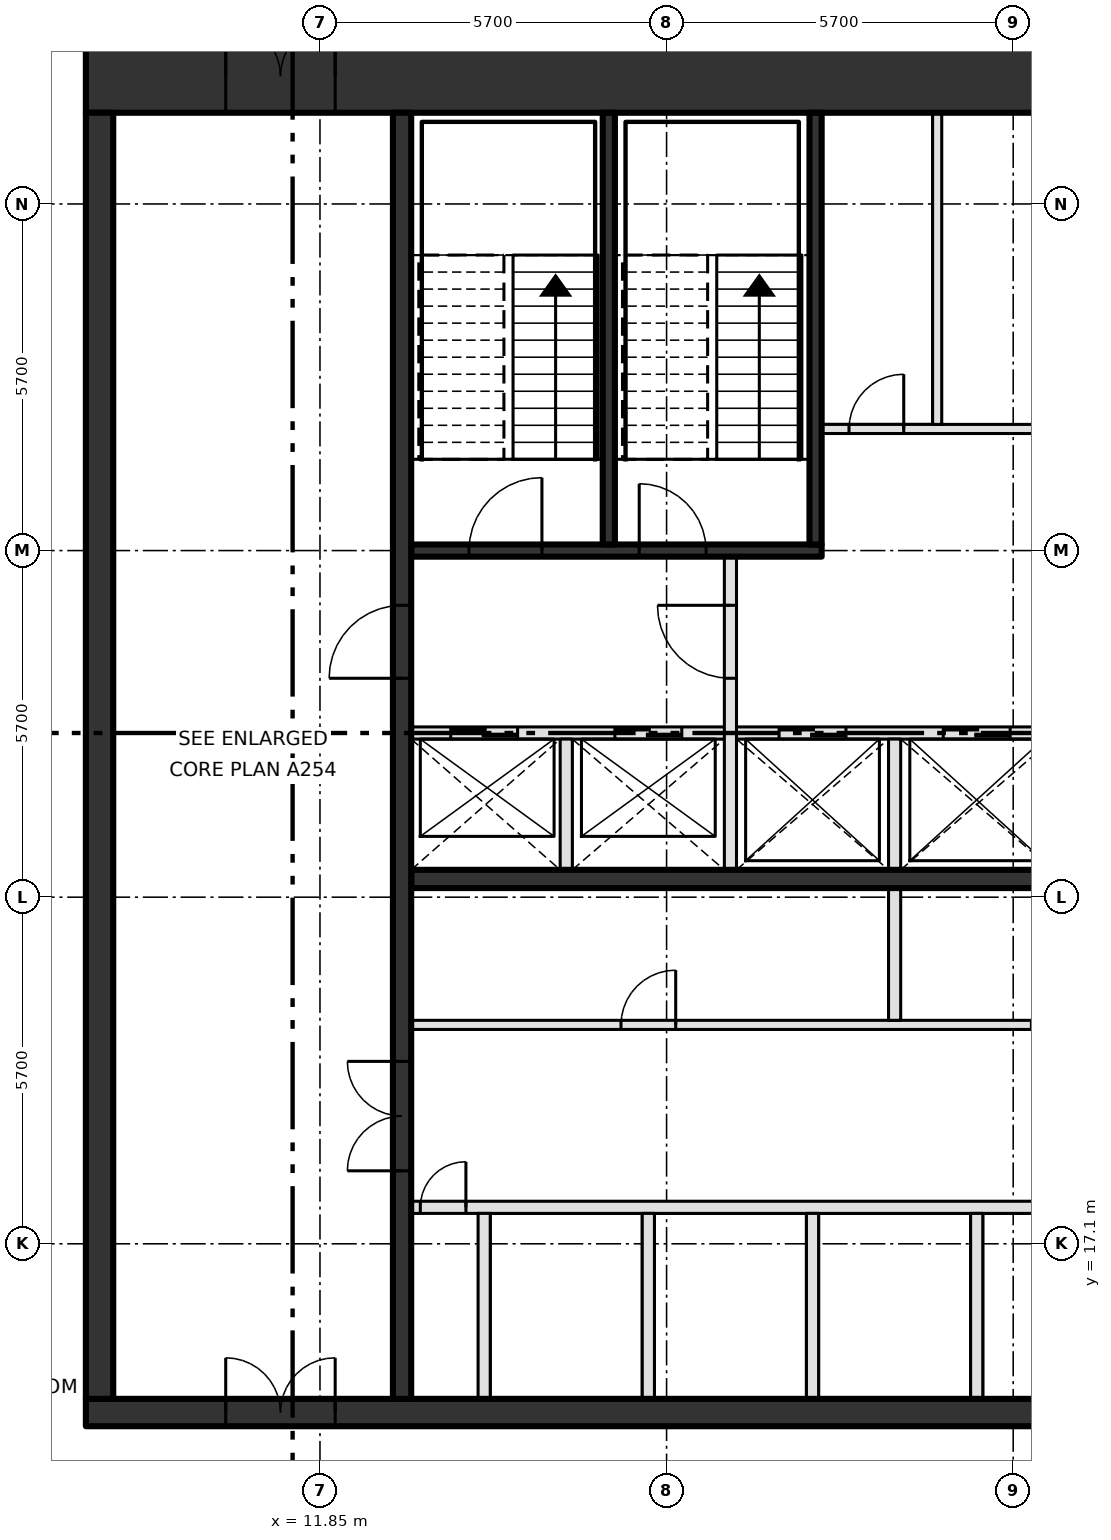
"""IFC4 building model, lengths in metres.
Left out: names, types, materials, properties, quantities, classifications, styles, units other than length and angle.
Written with IfcOpenShell. Run it as: python <this file> out.ifc"""

import sys

from ifc_helpers import new_model, si_unit, direction, frame, frame_2d, origin, place, context, subcontext, project, spatial, rectangle, extrude, element, fill, save


model = new_model("IFC4")
c1 = context("Model", 3, precision=1e-05, world=origin(), true_north=direction((0.0, 1.0)))
c2 = subcontext(c1, "Body", "Model", "MODEL_VIEW")
j1 = project(units=[si_unit("LENGTHUNIT", "METRE"), si_unit("PLANEANGLEUNIT", "RADIAN")], contexts=[c1])
p1 = place(None, origin())
s1 = spatial("IfcSite", under=j1, at=p1, CompositionType="ELEMENT")
p2 = place(p1, origin())
s2 = spatial("IfcBuilding", under=s1, at=p2, CompositionType="ELEMENT")
p3 = place(p2, frame((0.0, 0.0, 400.2)))
s3 = spatial("IfcBuildingStorey", under=s2, at=p3, CompositionType="ELEMENT", Elevation=400.2)
p4 = place(p3, frame((8.0, 14.325, -0.45), z_axis=(0.0, 0.0, 1.0), x_axis=(1.0, 0.0, 0.0)))
e1 = element("IfcWall", 1, at=p4, inside=s3, PredefinedType="SHEAR", context=c2, shape_type="SweptSolid", body=[
    extrude(rectangle(XDim=22.8, YDim=0.45, at=frame_2d((11.4, 0.0))), origin(), (0.0, 0.0, 1.0), 4.95),
])
p5 = place(p4, frame((2.3, 0.0, 0.45)))
e2 = element("IfcOpeningElement", 2, at=p5, cuts=e1, PredefinedType="OPENING", context=c2, shape_type="SweptSolid", body=[
    extrude(rectangle(XDim=1.8, YDim=2.1, at=frame_2d((0.9, 1.05))), frame((0.0, 0.235, 0.0), z_axis=(0.0, -1.0, 0.0), x_axis=(1.0, 0.0, 0.0)), (0.0, 0.0, 1.0), 0.47),
])
p6 = place(p3, frame((8.0, 36.3, -0.45), z_axis=(0.0, 0.0, 1.0), x_axis=(1.0, 0.0, 0.0)))
e3 = element("IfcWall", 3, at=p6, inside=s3, PredefinedType="SHEAR", context=c2, shape_type="SweptSolid", body=[
    extrude(rectangle(XDim=22.8, YDim=1.2, at=frame_2d((11.4, 0.0))), origin(), (0.0, 0.0, 1.0), 4.95),
])
p7 = place(p6, frame((2.3, 0.0, 0.45)))
e4 = element("IfcOpeningElement", 4, at=p7, cuts=e3, PredefinedType="OPENING", context=c2, shape_type="SweptSolid", body=[
    extrude(rectangle(XDim=1.8, YDim=2.1, at=frame_2d((0.9, 1.05))), frame((0.0, 0.61, 0.0), z_axis=(0.0, -1.0, 0.0), x_axis=(1.0, 0.0, 0.0)), (0.0, 0.0, 1.0), 1.22),
])
p8 = place(p3, frame((8.225, 14.55, -0.45), z_axis=(0.0, 0.0, 1.0), x_axis=(0.0, 1.0, 0.0)))
e5 = element("IfcWall", 5, at=p8, inside=s3, PredefinedType="SHEAR", context=c2, shape_type="SweptSolid", body=[
    extrude(rectangle(XDim=21.15, YDim=0.45, at=frame_2d((10.575, 0.0))), origin(), (0.0, 0.0, 1.0), 4.95),
])
p9 = place(p3, frame((13.35, 17.7, 0.0), z_axis=(0.0, 0.0, 1.0), x_axis=(1.0, 0.0, 0.0)))
e6 = element("IfcWall", 6, at=p9, inside=s3, PredefinedType="SOLIDWALL", context=c2, shape_type="SweptSolid", body=[
    extrude(rectangle(XDim=13.425, YDim=0.2, at=frame_2d((6.712, 0.0))), origin(), (0.0, 0.0, 1.0), 4.5),
])
p10 = place(p9, frame((0.15, 0.0, 0.0)))
e7 = element("IfcOpeningElement", 7, at=p10, cuts=e6, PredefinedType="OPENING", context=c2, shape_type="SweptSolid", body=[
    extrude(rectangle(XDim=0.75, YDim=2.1, at=frame_2d((0.375, 1.05))), frame((0.0, 0.11, 0.0), z_axis=(0.0, -1.0, 0.0), x_axis=(1.0, 0.0, 0.0)), (0.0, 0.0, 1.0), 0.22),
])
p11 = place(p9, frame((12.3, 0.0, 0.0)))
e8 = element("IfcOpeningElement", 8, at=p11, cuts=e6, PredefinedType="OPENING", context=c2, shape_type="SweptSolid", body=[
    extrude(rectangle(XDim=0.75, YDim=2.1, at=frame_2d((0.375, 1.05))), frame((0.0, 0.11, 0.0), z_axis=(0.0, -1.0, 0.0), x_axis=(1.0, 0.0, 0.0)), (0.0, 0.0, 1.0), 0.22),
])
p12 = place(p3, frame((13.35, 20.7, 0.0), z_axis=(0.0, 0.0, 1.0), x_axis=(1.0, 0.0, 0.0)))
e9 = element("IfcWall", 9, at=p12, inside=s3, PredefinedType="PARTITIONING", context=c2, shape_type="SweptSolid", body=[
    extrude(rectangle(XDim=13.425, YDim=0.15, at=frame_2d((6.712, 0.0))), origin(), (0.0, 0.0, 1.0), 4.5),
])
p13 = place(p12, frame((3.45, 0.0, 0.0)))
e10 = element("IfcOpeningElement", 10, at=p13, cuts=e9, PredefinedType="OPENING", context=c2, shape_type="SweptSolid", body=[
    extrude(rectangle(XDim=0.9, YDim=2.1, at=frame_2d((0.45, 1.05))), frame((0.0, 0.085, 0.0), z_axis=(0.0, -1.0, 0.0), x_axis=(1.0, 0.0, 0.0)), (0.0, 0.0, 1.0), 0.17),
])
p14 = place(p12, frame((10.2, 0.0, 0.0)))
e11 = element("IfcOpeningElement", 11, at=p14, cuts=e9, PredefinedType="OPENING", context=c2, shape_type="SweptSolid", body=[
    extrude(rectangle(XDim=0.9, YDim=2.1, at=frame_2d((0.45, 1.05))), frame((0.0, 0.085, 0.0), z_axis=(0.0, -1.0, 0.0), x_axis=(1.0, 0.0, 0.0)), (0.0, 0.0, 1.0), 0.17),
])
p15 = place(p3, frame((13.35, 23.1, 0.0), z_axis=(0.0, 0.0, 1.0), x_axis=(1.0, 0.0, 0.0)))
e12 = element("IfcWall", 12, at=p15, inside=s3, PredefinedType="SHEAR", context=c2, shape_type="SweptSolid", body=[
    extrude(rectangle(XDim=17.0, YDim=0.3, at=frame_2d((8.5, 0.0))), origin(), (0.0, 0.0, 1.0), 4.5),
])
p16 = place(p3, frame((13.35, 25.5, 0.0), z_axis=(0.0, 0.0, 1.0), x_axis=(1.0, 0.0, 0.0)))
e13 = element("IfcWall", 13, at=p16, inside=s3, PredefinedType="SOLIDWALL", context=c2, shape_type="SweptSolid", body=[
    extrude(rectangle(XDim=17.0, YDim=0.2, at=frame_2d((8.5, 0.0))), origin(), (0.0, 0.0, 1.0), 4.5),
])
p17 = place(p16, frame((0.65, 0.0, 0.0)))
e14 = element("IfcOpeningElement", 14, at=p17, cuts=e13, PredefinedType="OPENING", context=c2, shape_type="SweptSolid", body=[
    extrude(rectangle(XDim=1.1, YDim=2.1, at=frame_2d((0.55, 1.05))), frame((0.0, 0.11, 0.0), z_axis=(0.0, -1.0, 0.0), x_axis=(1.0, 0.0, 0.0)), (0.0, 0.0, 1.0), 0.22),
])
p18 = place(p16, frame((3.35, 0.0, 0.0)))
e15 = element("IfcOpeningElement", 15, at=p18, cuts=e13, PredefinedType="OPENING", context=c2, shape_type="SweptSolid", body=[
    extrude(rectangle(XDim=1.1, YDim=2.1, at=frame_2d((0.55, 1.05))), frame((0.0, 0.11, 0.0), z_axis=(0.0, -1.0, 0.0), x_axis=(1.0, 0.0, 0.0)), (0.0, 0.0, 1.0), 0.22),
])
p19 = place(p16, frame((6.05, 0.0, 0.0)))
e16 = element("IfcOpeningElement", 16, at=p19, cuts=e13, PredefinedType="OPENING", context=c2, shape_type="SweptSolid", body=[
    extrude(rectangle(XDim=1.1, YDim=2.1, at=frame_2d((0.55, 1.05))), frame((0.0, 0.11, 0.0), z_axis=(0.0, -1.0, 0.0), x_axis=(1.0, 0.0, 0.0)), (0.0, 0.0, 1.0), 0.22),
])
p20 = place(p16, frame((8.75, 0.0, 0.0)))
e17 = element("IfcOpeningElement", 17, at=p20, cuts=e13, PredefinedType="OPENING", context=c2, shape_type="SweptSolid", body=[
    extrude(rectangle(XDim=1.1, YDim=2.1, at=frame_2d((0.55, 1.05))), frame((0.0, 0.11, 0.0), z_axis=(0.0, -1.0, 0.0), x_axis=(1.0, 0.0, 0.0)), (0.0, 0.0, 1.0), 0.22),
])
p21 = place(p16, frame((13.0, 0.0, 0.0)))
e18 = element("IfcOpeningElement", 18, at=p21, cuts=e13, PredefinedType="OPENING", context=c2, shape_type="SweptSolid", body=[
    extrude(rectangle(XDim=0.9, YDim=2.1, at=frame_2d((0.45, 1.05))), frame((0.0, 0.11, 0.0), z_axis=(0.0, -1.0, 0.0), x_axis=(1.0, 0.0, 0.0)), (0.0, 0.0, 1.0), 0.22),
])
p22 = place(p3, frame((13.35, 28.5, 0.0), z_axis=(0.0, 0.0, 1.0), x_axis=(1.0, 0.0, 0.0)))
e19 = element("IfcWall", 19, at=p22, inside=s3, PredefinedType="SOLIDWALL", context=c2, shape_type="SweptSolid", body=[
    extrude(rectangle(XDim=6.75, YDim=0.2, at=frame_2d((3.375, 0.0))), origin(), (0.0, 0.0, 1.0), 4.5),
])
p23 = place(p22, frame((0.95, 0.0, 0.0)))
e20 = element("IfcOpeningElement", 20, at=p23, cuts=e19, PredefinedType="OPENING", context=c2, shape_type="SweptSolid", body=[
    extrude(rectangle(XDim=1.2, YDim=2.1, at=frame_2d((0.6, 1.05))), frame((0.0, 0.11, 0.0), z_axis=(0.0, -1.0, 0.0), x_axis=(1.0, 0.0, 0.0)), (0.0, 0.0, 1.0), 0.22),
])
p24 = place(p22, frame((3.75, 0.0, 0.0)))
e21 = element("IfcOpeningElement", 21, at=p24, cuts=e19, PredefinedType="OPENING", context=c2, shape_type="SweptSolid", body=[
    extrude(rectangle(XDim=1.1, YDim=2.1, at=frame_2d((0.55, 1.05))), frame((0.0, 0.11, 0.0), z_axis=(0.0, -1.0, 0.0), x_axis=(1.0, 0.0, 0.0)), (0.0, 0.0, 1.0), 0.22),
])
p25 = place(p3, frame((20.1, 30.5, 0.0), z_axis=(0.0, 0.0, 1.0), x_axis=(1.0, 0.0, 0.0)))
e22 = element("IfcWall", 22, at=p25, inside=s3, PredefinedType="PARTITIONING", context=c2, shape_type="SweptSolid", body=[
    extrude(rectangle(XDim=10.25, YDim=0.15, at=frame_2d((5.125, 0.0))), origin(), (0.0, 0.0, 1.0), 4.5),
])
p26 = place(p25, frame((0.45, 0.0, 0.0)))
e23 = element("IfcOpeningElement", 23, at=p26, cuts=e22, PredefinedType="OPENING", context=c2, shape_type="SweptSolid", body=[
    extrude(rectangle(XDim=0.9, YDim=2.1, at=frame_2d((0.45, 1.05))), frame((0.0, 0.085, 0.0), z_axis=(0.0, -1.0, 0.0), x_axis=(1.0, 0.0, 0.0)), (0.0, 0.0, 1.0), 0.17),
])
p27 = place(p25, frame((5.25, 0.0, 0.0)))
e24 = element("IfcOpeningElement", 24, at=p27, cuts=e22, PredefinedType="OPENING", context=c2, shape_type="SweptSolid", body=[
    extrude(rectangle(XDim=0.9, YDim=2.1, at=frame_2d((0.45, 1.05))), frame((0.0, 0.085, 0.0), z_axis=(0.0, -1.0, 0.0), x_axis=(1.0, 0.0, 0.0)), (0.0, 0.0, 1.0), 0.17),
])
p28 = place(p3, frame((13.2, 14.55, 0.0), z_axis=(0.0, 0.0, 1.0), x_axis=(0.0, 1.0, 0.0)))
e25 = element("IfcWall", 25, at=p28, inside=s3, PredefinedType="SHEAR", context=c2, shape_type="SweptSolid", body=[
    extrude(rectangle(XDim=21.15, YDim=0.3, at=frame_2d((10.575, 0.0))), origin(), (0.0, 0.0, 1.0), 4.5),
])
p29 = place(p28, frame((3.75, 0.0, 0.0)))
e26 = element("IfcOpeningElement", 26, at=p29, cuts=e25, PredefinedType="OPENING", context=c2, shape_type="SweptSolid", body=[
    extrude(rectangle(XDim=1.8, YDim=2.1, at=frame_2d((0.9, 1.05))), frame((0.0, 0.16, 0.0), z_axis=(0.0, -1.0, 0.0), x_axis=(1.0, 0.0, 0.0)), (0.0, 0.0, 1.0), 0.32),
])
p30 = place(p28, frame((11.85, 0.0, 0.0)))
e27 = element("IfcOpeningElement", 27, at=p30, cuts=e25, PredefinedType="OPENING", context=c2, shape_type="SweptSolid", body=[
    extrude(rectangle(XDim=1.2, YDim=2.1, at=frame_2d((0.6, 1.05))), frame((0.0, 0.16, 0.0), z_axis=(0.0, -1.0, 0.0), x_axis=(1.0, 0.0, 0.0)), (0.0, 0.0, 1.0), 0.32),
])
p31 = place(p3, frame((14.55, 14.55, 0.0), z_axis=(0.0, 0.0, 1.0), x_axis=(0.0, 1.0, 0.0)))
e28 = element("IfcWall", 28, at=p31, inside=s3, PredefinedType="SOLIDWALL", context=c2, shape_type="SweptSolid", body=[
    extrude(rectangle(XDim=3.05, YDim=0.2, at=frame_2d((1.525, 0.0))), origin(), (0.0, 0.0, 1.0), 4.5),
])
p32 = place(p3, frame((15.9, 23.25, 0.0), z_axis=(0.0, 0.0, 1.0), x_axis=(0.0, 1.0, 0.0)))
e29 = element("IfcWall", 29, at=p32, inside=s3, PredefinedType="SOLIDWALL", context=c2, shape_type="SweptSolid", body=[
    extrude(rectangle(XDim=2.15, YDim=0.2, at=frame_2d((1.075, 0.0))), origin(), (0.0, 0.0, 1.0), 4.5),
])
p33 = place(p3, frame((16.6, 28.6, 0.0), z_axis=(0.0, 0.0, 1.0), x_axis=(0.0, 1.0, 0.0)))
e30 = element("IfcWall", 30, at=p33, inside=s3, PredefinedType="SOLIDWALL", context=c2, shape_type="SweptSolid", body=[
    extrude(rectangle(XDim=7.1, YDim=0.2, at=frame_2d((3.55, 0.0))), origin(), (0.0, 0.0, 1.0), 4.5),
])
p34 = place(p3, frame((17.25, 14.55, 0.0), z_axis=(0.0, 0.0, 1.0), x_axis=(0.0, 1.0, 0.0)))
e31 = element("IfcWall", 31, at=p34, inside=s3, PredefinedType="SOLIDWALL", context=c2, shape_type="SweptSolid", body=[
    extrude(rectangle(XDim=3.05, YDim=0.2, at=frame_2d((1.525, 0.0))), origin(), (0.0, 0.0, 1.0), 4.5),
])
p35 = place(p3, frame((18.6, 23.25, 0.0), z_axis=(0.0, 0.0, 1.0), x_axis=(0.0, 1.0, 0.0)))
e32 = element("IfcWall", 32, at=p35, inside=s3, PredefinedType="SOLIDWALL", context=c2, shape_type="SweptSolid", body=[
    extrude(rectangle(XDim=5.15, YDim=0.2, at=frame_2d((2.575, 0.0))), origin(), (0.0, 0.0, 1.0), 4.5),
])
p36 = place(p35, frame((3.15, 0.0, 0.0)))
e33 = element("IfcOpeningElement", 33, at=p36, cuts=e32, PredefinedType="OPENING", context=c2, shape_type="SweptSolid", body=[
    extrude(rectangle(XDim=1.2, YDim=2.1, at=frame_2d((0.6, 1.05))), frame((0.0, 0.11, 0.0), z_axis=(0.0, -1.0, 0.0), x_axis=(1.0, 0.0, 0.0)), (0.0, 0.0, 1.0), 0.22),
])
p37 = place(p3, frame((19.95, 14.55, 0.0), z_axis=(0.0, 0.0, 1.0), x_axis=(0.0, 1.0, 0.0)))
e34 = element("IfcWall", 34, at=p37, inside=s3, PredefinedType="SOLIDWALL", context=c2, shape_type="SweptSolid", body=[
    extrude(rectangle(XDim=3.05, YDim=0.2, at=frame_2d((1.525, 0.0))), origin(), (0.0, 0.0, 1.0), 4.5),
])
p38 = place(p3, frame((20.0, 28.6, 0.0), z_axis=(0.0, 0.0, 1.0), x_axis=(0.0, 1.0, 0.0)))
e35 = element("IfcWall", 35, at=p38, inside=s3, PredefinedType="SOLIDWALL", context=c2, shape_type="SweptSolid", body=[
    extrude(rectangle(XDim=7.1, YDim=0.2, at=frame_2d((3.55, 0.0))), origin(), (0.0, 0.0, 1.0), 4.5),
])
p39 = place(p3, frame((21.3, 20.775, 0.0), z_axis=(0.0, 0.0, 1.0), x_axis=(0.0, 1.0, 0.0)))
e36 = element("IfcWall", 36, at=p39, inside=s3, PredefinedType="SOLIDWALL", context=c2, shape_type="SweptSolid", body=[
    extrude(rectangle(XDim=4.625, YDim=0.2, at=frame_2d((2.312, 0.0))), origin(), (0.0, 0.0, 1.0), 4.5),
])
p40 = place(p3, frame((22.0, 30.575, 0.0), z_axis=(0.0, 0.0, 1.0), x_axis=(0.0, 1.0, 0.0)))
e37 = element("IfcWall", 37, at=p40, inside=s3, PredefinedType="PARTITIONING", context=c2, shape_type="SweptSolid", body=[
    extrude(rectangle(XDim=5.125, YDim=0.15, at=frame_2d((2.562, 0.0))), origin(), (0.0, 0.0, 1.0), 4.5),
])
p41 = place(p3, frame((22.65, 14.55, 0.0), z_axis=(0.0, 0.0, 1.0), x_axis=(0.0, 1.0, 0.0)))
e38 = element("IfcWall", 38, at=p41, inside=s3, PredefinedType="SOLIDWALL", context=c2, shape_type="SweptSolid", body=[
    extrude(rectangle(XDim=3.05, YDim=0.2, at=frame_2d((1.525, 0.0))), origin(), (0.0, 0.0, 1.0), 4.5),
])
p42 = place(p17, origin())
e39 = element("IfcDoor", 39, at=p42, inside=s3, OperationType="SLIDING_TO_LEFT", PredefinedType="DOOR", context=c2, shape_type="SweptSolid", body=[
    extrude(rectangle(XDim=1.1, YDim=2.1, at=frame_2d((0.55, 1.05))), frame((0.0, 0.025, 0.0), z_axis=(0.0, -1.0, 0.0), x_axis=(1.0, 0.0, 0.0)), (0.0, 0.0, 1.0), 0.05),
])
fill(e14, e39)
p43 = place(p18, origin())
e40 = element("IfcDoor", 40, at=p43, inside=s3, OperationType="SLIDING_TO_LEFT", PredefinedType="DOOR", context=c2, shape_type="SweptSolid", body=[
    extrude(rectangle(XDim=1.1, YDim=2.1, at=frame_2d((0.55, 1.05))), frame((0.0, 0.025, 0.0), z_axis=(0.0, -1.0, 0.0), x_axis=(1.0, 0.0, 0.0)), (0.0, 0.0, 1.0), 0.05),
])
fill(e15, e40)
p44 = place(p19, origin())
e41 = element("IfcDoor", 41, at=p44, inside=s3, OperationType="SLIDING_TO_LEFT", PredefinedType="DOOR", context=c2, shape_type="SweptSolid", body=[
    extrude(rectangle(XDim=1.1, YDim=2.1, at=frame_2d((0.55, 1.05))), frame((0.0, 0.025, 0.0), z_axis=(0.0, -1.0, 0.0), x_axis=(1.0, 0.0, 0.0)), (0.0, 0.0, 1.0), 0.05),
])
fill(e16, e41)
p45 = place(p20, origin())
e42 = element("IfcDoor", 42, at=p45, inside=s3, OperationType="SLIDING_TO_LEFT", PredefinedType="DOOR", context=c2, shape_type="SweptSolid", body=[
    extrude(rectangle(XDim=1.1, YDim=2.1, at=frame_2d((0.55, 1.05))), frame((0.0, 0.025, 0.0), z_axis=(0.0, -1.0, 0.0), x_axis=(1.0, 0.0, 0.0)), (0.0, 0.0, 1.0), 0.05),
])
fill(e17, e42)
p46 = place(p10, origin())
e43 = element("IfcDoor", 43, at=p46, inside=s3, OperationType="SINGLE_SWING_RIGHT", PredefinedType="DOOR", context=c2, shape_type="SweptSolid", body=[
    extrude(rectangle(XDim=0.75, YDim=2.1, at=frame_2d((0.375, 1.05))), frame((0.0, 0.025, 0.0), z_axis=(0.0, -1.0, 0.0), x_axis=(1.0, 0.0, 0.0)), (0.0, 0.0, 1.0), 0.05),
])
fill(e7, e43)
p47 = place(p13, origin())
e44 = element("IfcDoor", 44, at=p47, inside=s3, OperationType="SINGLE_SWING_RIGHT", PredefinedType="DOOR", context=c2, shape_type="SweptSolid", body=[
    extrude(rectangle(XDim=0.9, YDim=2.1, at=frame_2d((0.45, 1.05))), frame((0.0, 0.025, 0.0), z_axis=(0.0, -1.0, 0.0), x_axis=(1.0, 0.0, 0.0)), (0.0, 0.0, 1.0), 0.05),
])
fill(e10, e44)
p48 = place(p26, origin())
e45 = element("IfcDoor", 45, at=p48, inside=s3, OperationType="SINGLE_SWING_RIGHT", PredefinedType="DOOR", context=c2, shape_type="SweptSolid", body=[
    extrude(rectangle(XDim=0.9, YDim=2.1, at=frame_2d((0.45, 1.05))), frame((0.0, 0.025, 0.0), z_axis=(0.0, -1.0, 0.0), x_axis=(1.0, 0.0, 0.0)), (0.0, 0.0, 1.0), 0.05),
])
fill(e23, e45)
p49 = place(p23, origin())
e46 = element("IfcDoor", 46, at=p49, inside=s3, OperationType="SINGLE_SWING_RIGHT", PredefinedType="DOOR", context=c2, shape_type="SweptSolid", body=[
    extrude(rectangle(XDim=1.2, YDim=2.1, at=frame_2d((0.6, 1.05))), frame((0.0, 0.025, 0.0), z_axis=(0.0, -1.0, 0.0), x_axis=(1.0, 0.0, 0.0)), (0.0, 0.0, 1.0), 0.05),
])
fill(e20, e46)
p50 = place(p24, origin())
e47 = element("IfcDoor", 47, at=p50, inside=s3, OperationType="SINGLE_SWING_LEFT", PredefinedType="DOOR", context=c2, shape_type="SweptSolid", body=[
    extrude(rectangle(XDim=1.1, YDim=2.1, at=frame_2d((0.55, 1.05))), frame((0.0, 0.025, 0.0), z_axis=(0.0, -1.0, 0.0), x_axis=(1.0, 0.0, 0.0)), (0.0, 0.0, 1.0), 0.05),
])
fill(e21, e47)
p51 = place(p29, origin())
e48 = element("IfcDoor", 48, at=p51, inside=s3, OperationType="DOUBLE_DOOR_SINGLE_SWING", PredefinedType="DOOR", context=c2, shape_type="SweptSolid", body=[
    extrude(rectangle(XDim=1.8, YDim=2.1, at=frame_2d((0.9, 1.05))), frame((0.0, 0.025, 0.0), z_axis=(0.0, -1.0, 0.0), x_axis=(1.0, 0.0, 0.0)), (0.0, 0.0, 1.0), 0.05),
])
fill(e26, e48)
p52 = place(p30, origin())
e49 = element("IfcDoor", 49, at=p52, inside=s3, OperationType="SINGLE_SWING_LEFT", PredefinedType="DOOR", context=c2, shape_type="SweptSolid", body=[
    extrude(rectangle(XDim=1.2, YDim=2.1, at=frame_2d((0.6, 1.05))), frame((0.0, 0.025, 0.0), z_axis=(0.0, -1.0, 0.0), x_axis=(1.0, 0.0, 0.0)), (0.0, 0.0, 1.0), 0.05),
])
fill(e27, e49)
p53 = place(p36, origin())
e50 = element("IfcDoor", 50, at=p53, inside=s3, OperationType="SINGLE_SWING_RIGHT", PredefinedType="DOOR", context=c2, shape_type="SweptSolid", body=[
    extrude(rectangle(XDim=1.2, YDim=2.1, at=frame_2d((0.6, 1.05))), frame((0.0, 0.025, 0.0), z_axis=(0.0, -1.0, 0.0), x_axis=(1.0, 0.0, 0.0)), (0.0, 0.0, 1.0), 0.05),
])
fill(e33, e50)
p54 = place(p7, origin())
e51 = element("IfcDoor", 51, at=p54, inside=s3, OperationType="DOUBLE_DOOR_SINGLE_SWING", PredefinedType="DOOR", context=c2, shape_type="SweptSolid", body=[
    extrude(rectangle(XDim=1.8, YDim=2.1, at=frame_2d((0.9, 1.05))), frame((0.0, 0.025, 0.0), z_axis=(0.0, -1.0, 0.0), x_axis=(1.0, 0.0, 0.0)), (0.0, 0.0, 1.0), 0.05),
])
fill(e4, e51)
p55 = place(p5, origin())
e52 = element("IfcDoor", 52, at=p55, inside=s3, OperationType="DOUBLE_DOOR_SINGLE_SWING", PredefinedType="DOOR", context=c2, shape_type="SweptSolid", body=[
    extrude(rectangle(XDim=1.8, YDim=2.1, at=frame_2d((0.9, 1.05))), frame((0.0, 0.025, 0.0), z_axis=(0.0, -1.0, 0.0), x_axis=(1.0, 0.0, 0.0)), (0.0, 0.0, 1.0), 0.05),
])
fill(e2, e52)
save(model, sys.argv[1])
